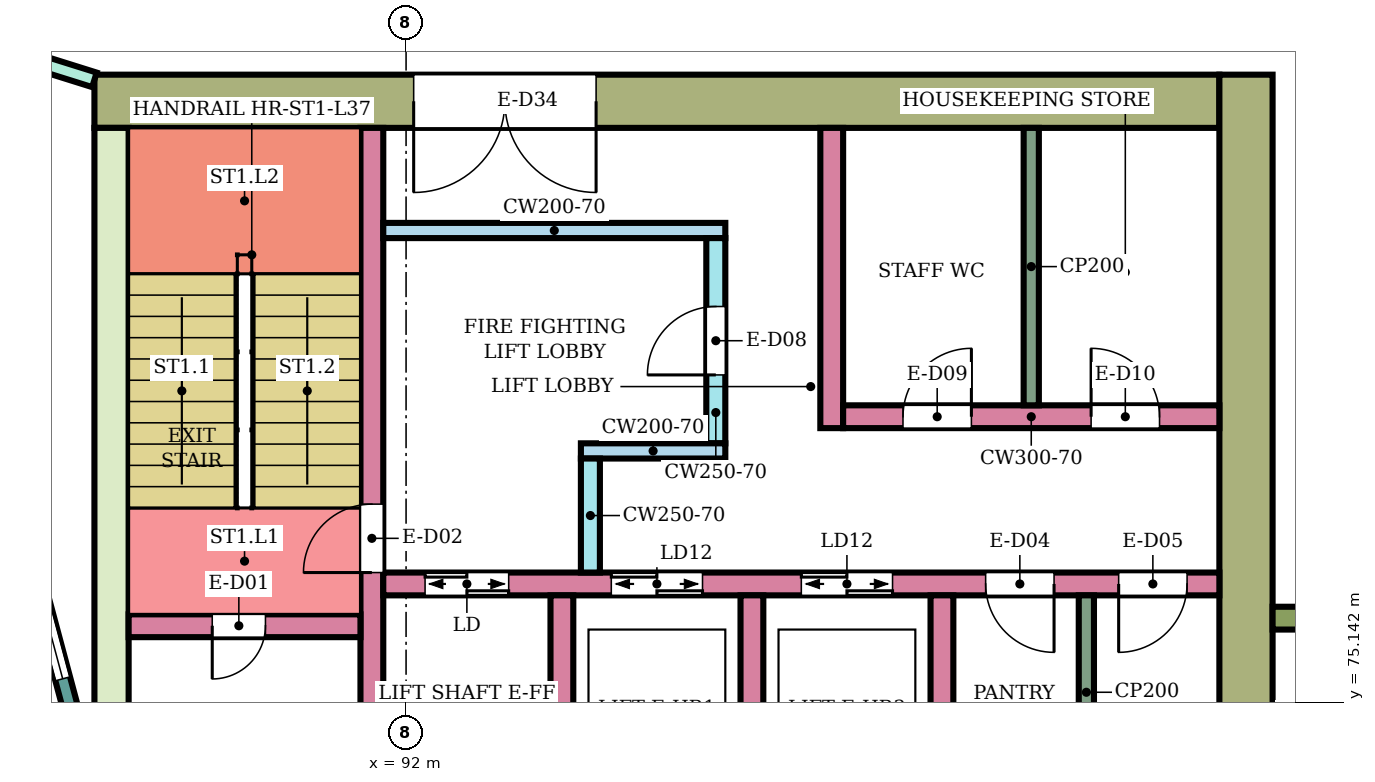
"""IFC4 building model, lengths in metres.
Left out: names, types, materials, properties, quantities, classifications, styles, units other than length and angle.
Written with IfcOpenShell. Run it as: python <this file> out.ifc"""

import sys

from ifc_helpers import new_model, si_unit, direction, frame, frame_2d, origin, place, context, subcontext, project, spatial, rectangle, extrude, element, fill, save


model = new_model("IFC4")
c1 = context("Model", 3, precision=1e-05, world=origin(), true_north=direction((0.0, 1.0)))
c2 = subcontext(c1, "Body", "Model", "MODEL_VIEW")
j1 = project(units=[si_unit("LENGTHUNIT", "METRE"), si_unit("PLANEANGLEUNIT", "RADIAN")], contexts=[c1])
p1 = place(None, origin())
s1 = spatial("IfcSite", under=j1, at=p1, CompositionType="ELEMENT")
p2 = place(p1, origin())
s2 = spatial("IfcBuilding", under=s1, at=p2, CompositionType="ELEMENT")
p3 = place(p2, frame((0.0, 0.0, 161.8)))
s3 = spatial("IfcBuildingStorey", under=s2, at=p3, CompositionType="ELEMENT", Elevation=161.8)
p4 = place(p3, frame((87.9, 83.05, 0.0), z_axis=(0.0, 0.0, 1.0), x_axis=(1.0, 0.0, 0.0)))
e1 = element("IfcWall", 1, at=p4, inside=s3, PredefinedType="SHEAR", context=c2, shape_type="SweptSolid", body=[
    extrude(rectangle(XDim=14.8, YDim=0.7, at=frame_2d((7.4, 0.0))), origin(), (0.0, 0.0, 1.0), 3.78),
])
p5 = place(p4, frame((4.2, 0.0, 0.0)))
e2 = element("IfcOpeningElement", 2, at=p5, cuts=e1, PredefinedType="OPENING", context=c2, shape_type="SweptSolid", body=[
    extrude(rectangle(XDim=2.4, YDim=2.4, at=frame_2d((1.2, 1.2))), frame((0.0, 0.36, 0.0), z_axis=(0.0, -1.0, 0.0), x_axis=(1.0, 0.0, 0.0)), (0.0, 0.0, 1.0), 0.72),
])
p6 = place(p3, frame((88.125, 75.0, 0.0), z_axis=(0.0, 0.0, 1.0), x_axis=(0.0, 1.0, 0.0)))
e3 = element("IfcWall", 3, at=p6, inside=s3, PredefinedType="SHEAR", context=c2, shape_type="SweptSolid", body=[
    extrude(rectangle(XDim=7.7, YDim=0.45, at=frame_2d((3.85, 0.0))), origin(), (0.0, 0.0, 1.0), 3.78),
])
p7 = place(p3, frame((103.05, 66.6, 0.0), z_axis=(0.0, 0.0, 1.0), x_axis=(0.0, 1.0, 0.0)))
e4 = element("IfcWall", 4, at=p7, inside=s3, PredefinedType="SHEAR", context=c2, shape_type="SweptSolid", body=[
    extrude(rectangle(XDim=16.8, YDim=0.7, at=frame_2d((8.4, 0.0))), origin(), (0.0, 0.0, 1.0), 3.78),
])
p8 = place(p3, frame((91.55, 75.0, 0.0), z_axis=(0.0, 0.0, 1.0), x_axis=(0.0, 1.0, 0.0)))
e5 = element("IfcWall", 5, at=p8, inside=s3, PredefinedType="SHEAR", context=c2, shape_type="SweptSolid", body=[
    extrude(rectangle(XDim=7.7, YDim=0.3, at=frame_2d((3.85, 0.0))), origin(), (0.0, 0.0, 1.0), 3.78),
])
p9 = place(p8, frame((1.85, 0.0, 0.0)))
e6 = element("IfcOpeningElement", 6, at=p9, cuts=e5, PredefinedType="OPENING", context=c2, shape_type="SweptSolid", body=[
    extrude(rectangle(XDim=0.9, YDim=2.1, at=frame_2d((0.45, 1.05))), frame((0.0, 0.16, 0.0), z_axis=(0.0, -1.0, 0.0), x_axis=(1.0, 0.0, 0.0)), (0.0, 0.0, 1.0), 0.32),
])
p10 = place(p3, frame((88.35, 76.15, 0.0), z_axis=(0.0, 0.0, 1.0), x_axis=(1.0, 0.0, 0.0)))
e7 = element("IfcWall", 7, at=p10, inside=s3, PredefinedType="SHEAR", context=c2, shape_type="SweptSolid", body=[
    extrude(rectangle(XDim=3.05, YDim=0.3, at=frame_2d((1.525, 0.0))), origin(), (0.0, 0.0, 1.0), 3.78),
])
p11 = place(p10, frame((1.1, 0.0, 0.0)))
e8 = element("IfcOpeningElement", 8, at=p11, cuts=e7, PredefinedType="OPENING", context=c2, shape_type="SweptSolid", body=[
    extrude(rectangle(XDim=0.7, YDim=2.0, at=frame_2d((0.35, 1.0))), frame((0.0, 0.16, 0.0), z_axis=(0.0, -1.0, 0.0), x_axis=(1.0, 0.0, 0.0)), (0.0, 0.0, 1.0), 0.32),
])
p12 = place(p3, frame((91.7, 76.7, 0.0), z_axis=(0.0, 0.0, 1.0), x_axis=(1.0, 0.0, 0.0)))
e9 = element("IfcWall", 9, at=p12, inside=s3, PredefinedType="SHEAR", context=c2, shape_type="SweptSolid", body=[
    extrude(rectangle(XDim=11.0, YDim=0.3, at=frame_2d((5.5, 0.0))), origin(), (0.0, 0.0, 1.0), 3.78),
])
p13 = place(p12, frame((0.55, 0.0, 0.0)))
e10 = element("IfcOpeningElement", 10, at=p13, cuts=e9, PredefinedType="OPENING", context=c2, shape_type="SweptSolid", body=[
    extrude(rectangle(XDim=1.1, YDim=2.1, at=frame_2d((0.55, 1.05))), frame((0.0, 0.16, 0.0), z_axis=(0.0, -1.0, 0.0), x_axis=(1.0, 0.0, 0.0)), (0.0, 0.0, 1.0), 0.32),
])
p14 = place(p12, frame((3.0, 0.0, 0.0)))
e11 = element("IfcOpeningElement", 11, at=p14, cuts=e9, PredefinedType="OPENING", context=c2, shape_type="SweptSolid", body=[
    extrude(rectangle(XDim=1.2, YDim=2.1, at=frame_2d((0.6, 1.05))), frame((0.0, 0.16, 0.0), z_axis=(0.0, -1.0, 0.0), x_axis=(1.0, 0.0, 0.0)), (0.0, 0.0, 1.0), 0.32),
])
p15 = place(p12, frame((5.5, 0.0, 0.0)))
e12 = element("IfcOpeningElement", 12, at=p15, cuts=e9, PredefinedType="OPENING", context=c2, shape_type="SweptSolid", body=[
    extrude(rectangle(XDim=1.2, YDim=2.1, at=frame_2d((0.6, 1.05))), frame((0.0, 0.16, 0.0), z_axis=(0.0, -1.0, 0.0), x_axis=(1.0, 0.0, 0.0)), (0.0, 0.0, 1.0), 0.32),
])
p16 = place(p12, frame((7.925, 0.0, 0.0)))
e13 = element("IfcOpeningElement", 13, at=p16, cuts=e9, PredefinedType="OPENING", context=c2, shape_type="SweptSolid", body=[
    extrude(rectangle(XDim=0.9, YDim=2.1, at=frame_2d((0.45, 1.05))), frame((0.0, 0.16, 0.0), z_axis=(0.0, -1.0, 0.0), x_axis=(1.0, 0.0, 0.0)), (0.0, 0.0, 1.0), 0.32),
])
p17 = place(p12, frame((9.675, 0.0, 0.0)))
e14 = element("IfcOpeningElement", 14, at=p17, cuts=e9, PredefinedType="OPENING", context=c2, shape_type="SweptSolid", body=[
    extrude(rectangle(XDim=0.9, YDim=2.1, at=frame_2d((0.45, 1.05))), frame((0.0, 0.16, 0.0), z_axis=(0.0, -1.0, 0.0), x_axis=(1.0, 0.0, 0.0)), (0.0, 0.0, 1.0), 0.32),
])
for number, where, z_axis, x_axis in (
    (15, (94.05, 74.0, 0.0), (0.0, 0.0, 1.0), (0.0, 1.0, 0.0)),
    (16, (96.55, 74.0, 0.0), (0.0, 0.0, 1.0), (0.0, 1.0, 0.0)),
    (17, (99.05, 74.0, 0.0), (0.0, 0.0, 1.0), (0.0, 1.0, 0.0)),
):
    element("IfcWall", number, at=place(p3, frame(where, z_axis=z_axis, x_axis=x_axis)), inside=s3, PredefinedType="SHEAR", context=c2, shape_type="SweptSolid", body=[
        extrude(rectangle(XDim=2.55, YDim=0.3, at=frame_2d((1.275, 0.0))), origin(), (0.0, 0.0, 1.0), 3.78),
    ])
p18 = place(p3, frame((91.7, 81.35, 0.0), z_axis=(0.0, 0.0, 1.0), x_axis=(1.0, 0.0, 0.0)))
e18 = element("IfcWall", 18, at=p18, inside=s3, PredefinedType="SHEAR", context=c2, shape_type="SweptSolid", body=[
    extrude(rectangle(XDim=4.5, YDim=0.2, at=frame_2d((2.25, 0.0))), origin(), (0.0, 0.0, 1.0), 3.78),
])
p19 = place(p3, frame((96.075, 78.55, 0.0), z_axis=(0.0, 0.0, 1.0), x_axis=(0.0, 1.0, 0.0)))
e19 = element("IfcWall", 19, at=p19, inside=s3, PredefinedType="SHEAR", context=c2, shape_type="SweptSolid", body=[
    extrude(rectangle(XDim=2.7, YDim=0.25, at=frame_2d((1.35, 0.0))), origin(), (0.0, 0.0, 1.0), 3.78),
])
p20 = place(p19, frame((0.9, 0.0, 0.0)))
e20 = element("IfcOpeningElement", 20, at=p20, cuts=e19, PredefinedType="OPENING", context=c2, shape_type="SweptSolid", body=[
    extrude(rectangle(XDim=0.9, YDim=2.1, at=frame_2d((0.45, 1.05))), frame((0.0, 0.135, 0.0), z_axis=(0.0, -1.0, 0.0), x_axis=(1.0, 0.0, 0.0)), (0.0, 0.0, 1.0), 0.27),
])
p21 = place(p3, frame((94.3, 78.45, 0.0), z_axis=(0.0, 0.0, 1.0), x_axis=(1.0, 0.0, 0.0)))
e21 = element("IfcWall", 21, at=p21, inside=s3, PredefinedType="SHEAR", context=c2, shape_type="SweptSolid", body=[
    extrude(rectangle(XDim=1.9, YDim=0.2, at=frame_2d((0.95, 0.0))), origin(), (0.0, 0.0, 1.0), 3.78),
])
p22 = place(p3, frame((94.425, 76.85, 0.0), z_axis=(0.0, 0.0, 1.0), x_axis=(0.0, 1.0, 0.0)))
e22 = element("IfcWall", 22, at=p22, inside=s3, PredefinedType="SHEAR", context=c2, shape_type="SweptSolid", body=[
    extrude(rectangle(XDim=1.5, YDim=0.25, at=frame_2d((0.75, 0.0))), origin(), (0.0, 0.0, 1.0), 3.78),
])
p23 = place(p3, frame((97.6, 78.75, 0.0), z_axis=(0.0, 0.0, 1.0), x_axis=(0.0, 1.0, 0.0)))
e23 = element("IfcWall", 23, at=p23, inside=s3, PredefinedType="SHEAR", context=c2, shape_type="SweptSolid", body=[
    extrude(rectangle(XDim=3.95, YDim=0.3, at=frame_2d((1.975, 0.0))), origin(), (0.0, 0.0, 1.0), 3.78),
])
p24 = place(p3, frame((97.75, 78.9, 0.0), z_axis=(0.0, 0.0, 1.0), x_axis=(1.0, 0.0, 0.0)))
e24 = element("IfcWall", 24, at=p24, inside=s3, PredefinedType="SHEAR", context=c2, shape_type="SweptSolid", body=[
    extrude(rectangle(XDim=4.95, YDim=0.3, at=frame_2d((2.475, 0.0))), origin(), (0.0, 0.0, 1.0), 3.78),
])
p25 = place(p24, frame((0.788, 0.0, 0.0)))
e25 = element("IfcOpeningElement", 25, at=p25, cuts=e24, PredefinedType="OPENING", context=c2, shape_type="SweptSolid", body=[
    extrude(rectangle(XDim=0.9, YDim=2.1, at=frame_2d((0.45, 1.05))), frame((0.0, 0.16, 0.0), z_axis=(0.0, -1.0, 0.0), x_axis=(1.0, 0.0, 0.0)), (0.0, 0.0, 1.0), 0.32),
])
p26 = place(p24, frame((3.262, 0.0, 0.0)))
e26 = element("IfcOpeningElement", 26, at=p26, cuts=e24, PredefinedType="OPENING", context=c2, shape_type="SweptSolid", body=[
    extrude(rectangle(XDim=0.9, YDim=2.1, at=frame_2d((0.45, 1.05))), frame((0.0, 0.16, 0.0), z_axis=(0.0, -1.0, 0.0), x_axis=(1.0, 0.0, 0.0)), (0.0, 0.0, 1.0), 0.32),
])
p27 = place(p3, frame((103.4, 76.25, 0.0), z_axis=(0.0, 0.0, 1.0), x_axis=(1.0, 0.0, 0.0)))
e27 = element("IfcWall", 27, at=p27, inside=s3, PredefinedType="NOTDEFINED", context=c2, shape_type="SweptSolid", body=[
    extrude(rectangle(XDim=2.416, YDim=0.3, at=frame_2d((1.208, 0.0))), origin(), (0.0, 0.0, 1.0), 4.1),
])
p28 = place(p3, frame((87.604, 75.0, 0.0), z_axis=(0.0, 0.0, 1.0), x_axis=(-0.258789828301, 0.965933654434, 0.0)))
e28 = element("IfcWall", 28, at=p28, inside=s3, PredefinedType="NOTDEFINED", context=c2, shape_type="SweptSolid", body=[
    extrude(rectangle(XDim=3.936, YDim=0.2, at=frame_2d((1.968, 0.0))), origin(), (0.0, 0.0, 1.0), 4.1),
])
p29 = place(p28, frame((0.468, 0.0, 0.9)))
e29 = element("IfcOpeningElement", 29, at=p29, cuts=e28, PredefinedType="OPENING", context=c2, shape_type="SweptSolid", body=[
    extrude(rectangle(XDim=3.0, YDim=2.3, at=frame_2d((1.5, 1.15))), frame((0.0, 0.11, 0.0), z_axis=(0.0, -1.0, 0.0), x_axis=(1.0, 0.0, 0.0)), (0.0, 0.0, 1.0), 0.22),
])
p30 = place(p3, frame((85.587, 84.057, 0.0), z_axis=(0.0, 0.0, 1.0), x_axis=(0.954239513179, -0.299043393987, 0.0)))
e30 = element("IfcWall", 30, at=p30, inside=s3, PredefinedType="PARTITIONING", context=c2, shape_type="SweptSolid", body=[
    extrude(rectangle(XDim=2.424, YDim=0.2, at=frame_2d((1.212, 0.0))), origin(), (0.0, 0.0, 1.0), 3.65),
])
p31 = place(p30, frame((0.762, 0.0, 0.0)))
e31 = element("IfcOpeningElement", 31, at=p31, cuts=e30, PredefinedType="OPENING", context=c2, shape_type="SweptSolid", body=[
    extrude(rectangle(XDim=0.9, YDim=2.1, at=frame_2d((0.45, 1.05))), frame((0.0, 0.11, 0.0), z_axis=(0.0, -1.0, 0.0), x_axis=(1.0, 0.0, 0.0)), (0.0, 0.0, 1.0), 0.22),
])
p32 = place(p3, frame((100.95, 74.0, 0.0), z_axis=(0.0, 0.0, 1.0), x_axis=(0.0, 1.0, 0.0)))
e32 = element("IfcWall", 32, at=p32, inside=s3, PredefinedType="PARTITIONING", context=c2, shape_type="SweptSolid", body=[
    extrude(rectangle(XDim=2.55, YDim=0.2, at=frame_2d((1.275, 0.0))), origin(), (0.0, 0.0, 1.0), 3.78),
])
p33 = place(p3, frame((100.225, 79.05, 0.0), z_axis=(0.0, 0.0, 1.0), x_axis=(0.0, 1.0, 0.0)))
e33 = element("IfcWall", 33, at=p33, inside=s3, PredefinedType="PARTITIONING", context=c2, shape_type="SweptSolid", body=[
    extrude(rectangle(XDim=3.65, YDim=0.2, at=frame_2d((1.825, 0.0))), origin(), (0.0, 0.0, 1.0), 3.78),
])
p34 = place(p29, origin())
e34 = element("IfcWindow", 34, at=p34, inside=s3, PartitioningType="SINGLE_PANEL", PredefinedType="WINDOW", context=c2, shape_type="SweptSolid", body=[
    extrude(rectangle(XDim=3.0, YDim=2.3, at=frame_2d((1.5, 1.15))), frame((0.0, 0.03, 0.0), z_axis=(0.0, -1.0, 0.0), x_axis=(1.0, 0.0, 0.0)), (0.0, 0.0, 1.0), 0.06),
])
fill(e29, e34)
p35 = place(p11, frame((0.7, 0.0, 0.0), z_axis=(0.0, 0.0, 1.0), x_axis=(-1.0, 0.0, 0.0)))
e35 = element("IfcDoor", 35, at=p35, inside=s3, OperationType="SINGLE_SWING_RIGHT", PredefinedType="DOOR", context=c2, shape_type="SweptSolid", body=[
    extrude(rectangle(XDim=0.7, YDim=2.0, at=frame_2d((0.35, 1.0))), frame((0.0, 0.025, 0.0), z_axis=(0.0, -1.0, 0.0), x_axis=(1.0, 0.0, 0.0)), (0.0, 0.0, 1.0), 0.05),
])
fill(e8, e35)
p36 = place(p9, origin())
e36 = element("IfcDoor", 36, at=p36, inside=s3, OperationType="SINGLE_SWING_LEFT", PredefinedType="DOOR", context=c2, shape_type="SweptSolid", body=[
    extrude(rectangle(XDim=0.9, YDim=2.1, at=frame_2d((0.45, 1.05))), frame((0.0, 0.025, 0.0), z_axis=(0.0, -1.0, 0.0), x_axis=(1.0, 0.0, 0.0)), (0.0, 0.0, 1.0), 0.05),
])
fill(e6, e36)
p37 = place(p13, origin())
e37 = element("IfcDoor", 37, at=p37, inside=s3, OperationType="DOUBLE_DOOR_SLIDING", PredefinedType="DOOR", context=c2, shape_type="SweptSolid", body=[
    extrude(rectangle(XDim=1.1, YDim=2.1, at=frame_2d((0.55, 1.05))), frame((0.0, 0.025, 0.0), z_axis=(0.0, -1.0, 0.0), x_axis=(1.0, 0.0, 0.0)), (0.0, 0.0, 1.0), 0.05),
])
fill(e10, e37)
p38 = place(p14, origin())
e38 = element("IfcDoor", 38, at=p38, inside=s3, OperationType="DOUBLE_DOOR_SLIDING", PredefinedType="DOOR", context=c2, shape_type="SweptSolid", body=[
    extrude(rectangle(XDim=1.2, YDim=2.1, at=frame_2d((0.6, 1.05))), frame((0.0, 0.025, 0.0), z_axis=(0.0, -1.0, 0.0), x_axis=(1.0, 0.0, 0.0)), (0.0, 0.0, 1.0), 0.05),
])
fill(e11, e38)
p39 = place(p15, origin())
e39 = element("IfcDoor", 39, at=p39, inside=s3, OperationType="DOUBLE_DOOR_SLIDING", PredefinedType="DOOR", context=c2, shape_type="SweptSolid", body=[
    extrude(rectangle(XDim=1.2, YDim=2.1, at=frame_2d((0.6, 1.05))), frame((0.0, 0.025, 0.0), z_axis=(0.0, -1.0, 0.0), x_axis=(1.0, 0.0, 0.0)), (0.0, 0.0, 1.0), 0.05),
])
fill(e12, e39)
p40 = place(p16, frame((0.9, 0.0, 0.0), z_axis=(0.0, 0.0, 1.0), x_axis=(-1.0, 0.0, 0.0)))
e40 = element("IfcDoor", 40, at=p40, inside=s3, OperationType="SINGLE_SWING_LEFT", PredefinedType="DOOR", context=c2, shape_type="SweptSolid", body=[
    extrude(rectangle(XDim=0.9, YDim=2.1, at=frame_2d((0.45, 1.05))), frame((0.0, 0.025, 0.0), z_axis=(0.0, -1.0, 0.0), x_axis=(1.0, 0.0, 0.0)), (0.0, 0.0, 1.0), 0.05),
])
fill(e13, e40)
p41 = place(p17, frame((0.9, 0.0, 0.0), z_axis=(0.0, 0.0, 1.0), x_axis=(-1.0, 0.0, 0.0)))
e41 = element("IfcDoor", 41, at=p41, inside=s3, OperationType="SINGLE_SWING_RIGHT", PredefinedType="DOOR", context=c2, shape_type="SweptSolid", body=[
    extrude(rectangle(XDim=0.9, YDim=2.1, at=frame_2d((0.45, 1.05))), frame((0.0, 0.025, 0.0), z_axis=(0.0, -1.0, 0.0), x_axis=(1.0, 0.0, 0.0)), (0.0, 0.0, 1.0), 0.05),
])
fill(e14, e41)
p42 = place(p20, origin())
e42 = element("IfcDoor", 42, at=p42, inside=s3, OperationType="SINGLE_SWING_LEFT", PredefinedType="DOOR", context=c2, shape_type="SweptSolid", body=[
    extrude(rectangle(XDim=0.9, YDim=2.1, at=frame_2d((0.45, 1.05))), frame((0.0, 0.025, 0.0), z_axis=(0.0, -1.0, 0.0), x_axis=(1.0, 0.0, 0.0)), (0.0, 0.0, 1.0), 0.05),
])
fill(e20, e42)
p43 = place(p25, origin())
e43 = element("IfcDoor", 43, at=p43, inside=s3, OperationType="SINGLE_SWING_RIGHT", PredefinedType="DOOR", context=c2, shape_type="SweptSolid", body=[
    extrude(rectangle(XDim=0.9, YDim=2.1, at=frame_2d((0.45, 1.05))), frame((0.0, 0.025, 0.0), z_axis=(0.0, -1.0, 0.0), x_axis=(1.0, 0.0, 0.0)), (0.0, 0.0, 1.0), 0.05),
])
fill(e25, e43)
p44 = place(p26, origin())
e44 = element("IfcDoor", 44, at=p44, inside=s3, OperationType="SINGLE_SWING_LEFT", PredefinedType="DOOR", context=c2, shape_type="SweptSolid", body=[
    extrude(rectangle(XDim=0.9, YDim=2.1, at=frame_2d((0.45, 1.05))), frame((0.0, 0.025, 0.0), z_axis=(0.0, -1.0, 0.0), x_axis=(1.0, 0.0, 0.0)), (0.0, 0.0, 1.0), 0.05),
])
fill(e26, e44)
p45 = place(p5, frame((2.4, 0.0, 0.0), z_axis=(0.0, 0.0, 1.0), x_axis=(-1.0, 0.0, 0.0)))
e45 = element("IfcDoor", 45, at=p45, inside=s3, OperationType="DOUBLE_DOOR_SINGLE_SWING", PredefinedType="DOOR", context=c2, shape_type="SweptSolid", body=[
    extrude(rectangle(XDim=2.4, YDim=2.4, at=frame_2d((1.2, 1.2))), frame((0.0, 0.025, 0.0), z_axis=(0.0, -1.0, 0.0), x_axis=(1.0, 0.0, 0.0)), (0.0, 0.0, 1.0), 0.05),
])
fill(e2, e45)
save(model, sys.argv[1])
